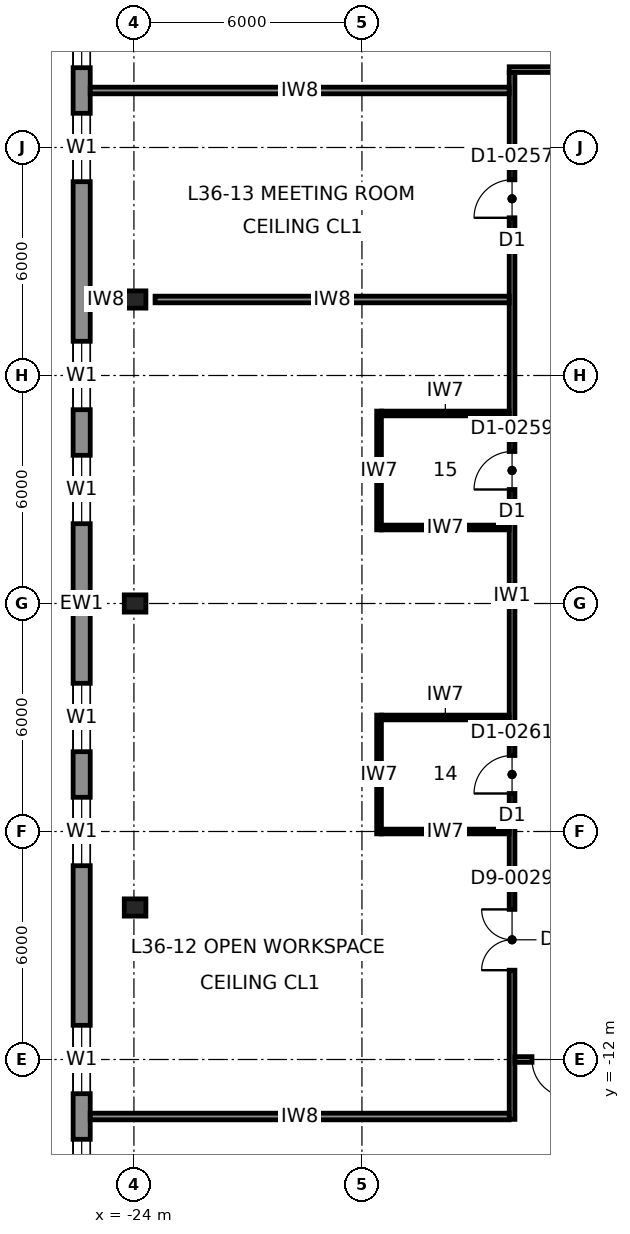
"""IFC4 building model, lengths in metres.
Left out: names, types, materials, properties, quantities, classifications, styles, units other than length and angle.
Written with IfcOpenShell. Run it as: python <this file> out.ifc"""

import sys

from ifc_helpers import new_model, si_unit, direction, frame, frame_2d, origin, origin_2d, place, context, subcontext, project, spatial, rectangle, i_section, extrude, element, fill, save


model = new_model("IFC4")
c1 = context("Model", 3, precision=1e-05, world=origin(), true_north=direction((0.0, 1.0)))
c2 = subcontext(c1, "Body", "Model", "MODEL_VIEW")
j1 = project(units=[si_unit("LENGTHUNIT", "METRE"), si_unit("PLANEANGLEUNIT", "RADIAN")], contexts=[c1])
p1 = place(None, origin())
s1 = spatial("IfcSite", under=j1, at=p1, CompositionType="ELEMENT")
p2 = place(p1, origin())
s2 = spatial("IfcBuilding", under=s1, at=p2, CompositionType="ELEMENT")
p3 = place(p2, frame((0.0, 0.0, 171.8)))
s3 = spatial("IfcBuildingStorey", under=s2, at=p3, CompositionType="ELEMENT", Elevation=171.8)
for number, where, z_axis, x_axis in (
    (1, (-23.969, 0.0, 0.0), (0.04, 0.0, 0.999), (0.0, 1.0, 0.0)),
    (2, (-23.969, 8.0, 0.0), (0.04, 0.0, 0.999), (0.0, 1.0, 0.0)),
    (3, (-23.969, -8.0, 0.0), (0.04, 0.0, 0.999), (0.0, 1.0, 0.0)),
):
    element("IfcColumn", number, at=place(p3, frame(where, z_axis=z_axis, x_axis=x_axis)), inside=s3, PredefinedType="COLUMN", context=c2, shape_type="SweptSolid", body=[
        extrude(i_section(OverallWidth=0.454, OverallDepth=0.569, WebThickness=0.078, FlangeThickness=0.125, at=origin_2d()), origin(), (0.0, 0.0, 1.0), 4.003),
    ])
p4 = place(p3, frame((-25.375, 21.1, 0.0), z_axis=(0.0, 0.0, 1.0), x_axis=(0.0, -1.0, 0.0)))
e4 = element("IfcWall", 4, at=p4, inside=s3, PredefinedType="SOLIDWALL", context=c2, shape_type="SweptSolid", body=[
    extrude(rectangle(XDim=42.2, YDim=0.45, at=frame_2d((21.1, 0.0))), origin(), (0.0, 0.0, 1.0), 3.83),
])
p5 = place(p4, frame((5.2, 0.0, 0.7)))
e5 = element("IfcOpeningElement", 5, at=p5, cuts=e4, PredefinedType="OPENING", context=c2, shape_type="SweptSolid", body=[
    extrude(rectangle(XDim=1.8, YDim=2.6, at=frame_2d((0.9, 1.3))), frame((0.0, 0.235, 0.0), z_axis=(0.0, -1.0, 0.0), x_axis=(1.0, 0.0, 0.0)), (0.0, 0.0, 1.0), 0.47),
])
p6 = place(p4, frame((8.2, 0.0, 0.7)))
e6 = element("IfcOpeningElement", 6, at=p6, cuts=e4, PredefinedType="OPENING", context=c2, shape_type="SweptSolid", body=[
    extrude(rectangle(XDim=1.8, YDim=2.6, at=frame_2d((0.9, 1.3))), frame((0.0, 0.235, 0.0), z_axis=(0.0, -1.0, 0.0), x_axis=(1.0, 0.0, 0.0)), (0.0, 0.0, 1.0), 0.47),
])
p7 = place(p4, frame((14.2, 0.0, 0.7)))
e7 = element("IfcOpeningElement", 7, at=p7, cuts=e4, PredefinedType="OPENING", context=c2, shape_type="SweptSolid", body=[
    extrude(rectangle(XDim=1.8, YDim=2.6, at=frame_2d((0.9, 1.3))), frame((0.0, 0.235, 0.0), z_axis=(0.0, -1.0, 0.0), x_axis=(1.0, 0.0, 0.0)), (0.0, 0.0, 1.0), 0.47),
])
p8 = place(p4, frame((17.2, 0.0, 0.7)))
e8 = element("IfcOpeningElement", 8, at=p8, cuts=e4, PredefinedType="OPENING", context=c2, shape_type="SweptSolid", body=[
    extrude(rectangle(XDim=1.8, YDim=2.6, at=frame_2d((0.9, 1.3))), frame((0.0, 0.235, 0.0), z_axis=(0.0, -1.0, 0.0), x_axis=(1.0, 0.0, 0.0)), (0.0, 0.0, 1.0), 0.47),
])
p9 = place(p4, frame((23.2, 0.0, 0.7)))
e9 = element("IfcOpeningElement", 9, at=p9, cuts=e4, PredefinedType="OPENING", context=c2, shape_type="SweptSolid", body=[
    extrude(rectangle(XDim=1.8, YDim=2.6, at=frame_2d((0.9, 1.3))), frame((0.0, 0.235, 0.0), z_axis=(0.0, -1.0, 0.0), x_axis=(1.0, 0.0, 0.0)), (0.0, 0.0, 1.0), 0.47),
])
p10 = place(p4, frame((26.2, 0.0, 0.7)))
e10 = element("IfcOpeningElement", 10, at=p10, cuts=e4, PredefinedType="OPENING", context=c2, shape_type="SweptSolid", body=[
    extrude(rectangle(XDim=1.8, YDim=2.6, at=frame_2d((0.9, 1.3))), frame((0.0, 0.235, 0.0), z_axis=(0.0, -1.0, 0.0), x_axis=(1.0, 0.0, 0.0)), (0.0, 0.0, 1.0), 0.47),
])
p11 = place(p4, frame((32.2, 0.0, 0.7)))
e11 = element("IfcOpeningElement", 11, at=p11, cuts=e4, PredefinedType="OPENING", context=c2, shape_type="SweptSolid", body=[
    extrude(rectangle(XDim=1.8, YDim=2.6, at=frame_2d((0.9, 1.3))), frame((0.0, 0.235, 0.0), z_axis=(0.0, -1.0, 0.0), x_axis=(1.0, 0.0, 0.0)), (0.0, 0.0, 1.0), 0.47),
])
p12 = place(p4, frame((35.2, 0.0, 0.7)))
e12 = element("IfcOpeningElement", 12, at=p12, cuts=e4, PredefinedType="OPENING", context=c2, shape_type="SweptSolid", body=[
    extrude(rectangle(XDim=1.8, YDim=2.6, at=frame_2d((0.9, 1.3))), frame((0.0, 0.235, 0.0), z_axis=(0.0, -1.0, 0.0), x_axis=(1.0, 0.0, 0.0)), (0.0, 0.0, 1.0), 0.47),
])
p13 = place(p3, frame((-14.125, 14.05, 0.0), z_axis=(0.0, 0.0, 1.0), x_axis=(1.0, 0.0, 0.0)))
e13 = element("IfcWall", 13, at=p13, inside=s3, PredefinedType="PARTITIONING", context=c2, shape_type="SweptSolid", body=[
    extrude(rectangle(XDim=28.25, YDim=0.15, at=frame_2d((14.125, 0.0))), origin(), (0.0, 0.0, 1.0), 3.83),
])
p14 = place(p13, frame((2.425, 0.0, 0.0)))
e14 = element("IfcOpeningElement", 14, at=p14, cuts=e13, PredefinedType="OPENING", context=c2, shape_type="SweptSolid", body=[
    extrude(rectangle(XDim=1.6, YDim=2.3, at=frame_2d((0.8, 1.15))), frame((0.0, 0.085, 0.0), z_axis=(0.0, -1.0, 0.0), x_axis=(1.0, 0.0, 0.0)), (0.0, 0.0, 1.0), 0.17),
])
p15 = place(p13, frame((13.625, 0.0, 0.0)))
e15 = element("IfcOpeningElement", 15, at=p15, cuts=e13, PredefinedType="OPENING", context=c2, shape_type="SweptSolid", body=[
    extrude(rectangle(XDim=1.0, YDim=2.3, at=frame_2d((0.5, 1.15))), frame((0.0, 0.085, 0.0), z_axis=(0.0, -1.0, 0.0), x_axis=(1.0, 0.0, 0.0)), (0.0, 0.0, 1.0), 0.17),
])
p16 = place(p13, frame((24.225, 0.0, 0.0)))
e16 = element("IfcOpeningElement", 16, at=p16, cuts=e13, PredefinedType="OPENING", context=c2, shape_type="SweptSolid", body=[
    extrude(rectangle(XDim=1.6, YDim=2.3, at=frame_2d((0.8, 1.15))), frame((0.0, 0.085, 0.0), z_axis=(0.0, -1.0, 0.0), x_axis=(1.0, 0.0, 0.0)), (0.0, 0.0, 1.0), 0.17),
])
p17 = place(p13, frame((8.625, 0.0, 0.0)))
e17 = element("IfcOpeningElement", 17, at=p17, cuts=e13, PredefinedType="OPENING", context=c2, shape_type="SweptSolid", body=[
    extrude(rectangle(XDim=1.0, YDim=2.3, at=frame_2d((0.5, 1.15))), frame((0.0, 0.085, 0.0), z_axis=(0.0, -1.0, 0.0), x_axis=(1.0, 0.0, 0.0)), (0.0, 0.0, 1.0), 0.17),
])
p18 = place(p13, frame((18.625, 0.0, 0.0)))
e18 = element("IfcOpeningElement", 18, at=p18, cuts=e13, PredefinedType="OPENING", context=c2, shape_type="SweptSolid", body=[
    extrude(rectangle(XDim=1.0, YDim=2.3, at=frame_2d((0.5, 1.15))), frame((0.0, 0.085, 0.0), z_axis=(0.0, -1.0, 0.0), x_axis=(1.0, 0.0, 0.0)), (0.0, 0.0, 1.0), 0.17),
])
p19 = place(p3, frame((-14.05, 13.975, 0.0), z_axis=(0.0, 0.0, 1.0), x_axis=(0.0, -1.0, 0.0)))
e19 = element("IfcWall", 19, at=p19, inside=s3, PredefinedType="PARTITIONING", context=c2, shape_type="SweptSolid", body=[
    extrude(rectangle(XDim=27.55, YDim=0.15, at=frame_2d((13.775, 0.0))), origin(), (0.0, 0.0, 1.0), 3.83),
])
p20 = place(p19, frame((22.025, 0.0, 0.0)))
e20 = element("IfcOpeningElement", 20, at=p20, cuts=e19, PredefinedType="OPENING", context=c2, shape_type="SweptSolid", body=[
    extrude(rectangle(XDim=1.6, YDim=2.3, at=frame_2d((0.8, 1.15))), frame((0.0, 0.085, 0.0), z_axis=(0.0, -1.0, 0.0), x_axis=(1.0, 0.0, 0.0)), (0.0, 0.0, 1.0), 0.17),
])
p21 = place(p19, frame((2.825, 0.0, 0.0)))
e21 = element("IfcOpeningElement", 21, at=p21, cuts=e19, PredefinedType="OPENING", context=c2, shape_type="SweptSolid", body=[
    extrude(rectangle(XDim=1.0, YDim=2.3, at=frame_2d((0.5, 1.15))), frame((0.0, 0.085, 0.0), z_axis=(0.0, -1.0, 0.0), x_axis=(1.0, 0.0, 0.0)), (0.0, 0.0, 1.0), 0.17),
])
p22 = place(p19, frame((17.975, 0.0, 0.0)))
e22 = element("IfcOpeningElement", 22, at=p22, cuts=e19, PredefinedType="OPENING", context=c2, shape_type="SweptSolid", body=[
    extrude(rectangle(XDim=1.0, YDim=2.3, at=frame_2d((0.5, 1.15))), frame((0.0, 0.085, 0.0), z_axis=(0.0, -1.0, 0.0), x_axis=(1.0, 0.0, 0.0)), (0.0, 0.0, 1.0), 0.17),
])
p23 = place(p19, frame((9.975, 0.0, 0.0)))
e23 = element("IfcOpeningElement", 23, at=p23, cuts=e19, PredefinedType="OPENING", context=c2, shape_type="SweptSolid", body=[
    extrude(rectangle(XDim=1.0, YDim=2.3, at=frame_2d((0.5, 1.15))), frame((0.0, 0.085, 0.0), z_axis=(0.0, -1.0, 0.0), x_axis=(1.0, 0.0, 0.0)), (0.0, 0.0, 1.0), 0.17),
])
p24 = place(p3, frame((-12.0, -12.0, 0.0), z_axis=(0.0, 0.0, 1.0), x_axis=(-1.0, 0.0, 0.0)))
e24 = element("IfcWall", 24, at=p24, inside=s3, PredefinedType="PARTITIONING", context=c2, shape_type="SweptSolid", body=[
    extrude(rectangle(XDim=1.975, YDim=0.15, at=frame_2d((0.988, 0.0))), origin(), (0.0, 0.0, 1.0), 3.83),
])
p25 = place(p24, frame((0.525, 0.0, 0.0)))
e25 = element("IfcOpeningElement", 25, at=p25, cuts=e24, PredefinedType="OPENING", context=c2, shape_type="SweptSolid", body=[
    extrude(rectangle(XDim=1.0, YDim=2.3, at=frame_2d((0.5, 1.15))), frame((0.0, 0.085, 0.0), z_axis=(0.0, -1.0, 0.0), x_axis=(1.0, 0.0, 0.0)), (0.0, 0.0, 1.0), 0.17),
])
for number, where, z_axis, x_axis in (
    (26, (-25.15, 13.5, 0.0), (0.0, 0.0, 1.0), (1.0, 0.0, 0.0)),
    (27, (-14.125, -13.5, 0.0), (0.0, 0.0, 1.0), (-1.0, 0.0, 0.0)),
):
    element("IfcWall", number, at=place(p3, frame(where, z_axis=z_axis, x_axis=x_axis)), inside=s3, PredefinedType="PARTITIONING", context=c2, shape_type="SweptSolid", body=[
        extrude(rectangle(XDim=11.025, YDim=0.175, at=frame_2d((5.512, 0.0))), origin(), (0.0, 0.0, 1.0), 3.83),
    ])
p26 = place(p3, frame((-14.125, 8.0, 0.0), z_axis=(0.0, 0.0, 1.0), x_axis=(-1.0, 0.0, 0.0)))
e28 = element("IfcWall", 28, at=p26, inside=s3, PredefinedType="PARTITIONING", context=c2, shape_type="SweptSolid", body=[
    extrude(rectangle(XDim=9.319, YDim=0.175, at=frame_2d((4.66, 0.0))), origin(), (0.0, 0.0, 1.0), 2.84),
])
p27 = place(p3, frame((-24.333, 8.0, 0.0), z_axis=(0.0, 0.0, 1.0), x_axis=(-1.0, 0.0, 0.0)))
e29 = element("IfcWall", 29, at=p27, inside=s3, PredefinedType="PARTITIONING", context=c2, shape_type="SweptSolid", body=[
    extrude(rectangle(XDim=0.817, YDim=0.175, at=frame_2d((0.408, 0.0))), origin(), (0.0, 0.0, 1.0), 3.83),
])
p28 = place(p3, frame((-17.55, -6.062, 0.0), z_axis=(0.0, 0.0, 1.0), x_axis=(0.0, 1.0, 0.0)))
e30 = element("IfcWall", 30, at=p28, inside=s3, PredefinedType="PARTITIONING", context=c2, shape_type="SweptSolid", body=[
    extrude(rectangle(XDim=3.125, YDim=0.125, at=frame_2d((1.562, 0.0))), origin(), (0.0, 0.0, 1.0), 3.83),
])
for number, where, z_axis, x_axis in (
    (31, (-14.125, -6.0, 0.0), (0.0, 0.0, 1.0), (-1.0, 0.0, 0.0)),
    (32, (-14.125, -3.0, 0.0), (0.0, 0.0, 1.0), (-1.0, 0.0, 0.0)),
):
    element("IfcWall", number, at=place(p3, frame(where, z_axis=z_axis, x_axis=x_axis)), inside=s3, PredefinedType="PARTITIONING", context=c2, shape_type="SweptSolid", body=[
        extrude(rectangle(XDim=3.363, YDim=0.125, at=frame_2d((1.681, 0.0))), origin(), (0.0, 0.0, 1.0), 3.83),
    ])
p29 = place(p3, frame((-17.55, 1.938, 0.0), z_axis=(0.0, 0.0, 1.0), x_axis=(0.0, 1.0, 0.0)))
e33 = element("IfcWall", 33, at=p29, inside=s3, PredefinedType="PARTITIONING", context=c2, shape_type="SweptSolid", body=[
    extrude(rectangle(XDim=3.125, YDim=0.125, at=frame_2d((1.562, 0.0))), origin(), (0.0, 0.0, 1.0), 3.83),
])
for number, where, z_axis, x_axis in (
    (34, (-14.125, 2.0, 0.0), (0.0, 0.0, 1.0), (-1.0, 0.0, 0.0)),
    (35, (-14.125, 5.0, 0.0), (0.0, 0.0, 1.0), (-1.0, 0.0, 0.0)),
):
    element("IfcWall", number, at=place(p3, frame(where, z_axis=z_axis, x_axis=x_axis)), inside=s3, PredefinedType="PARTITIONING", context=c2, shape_type="SweptSolid", body=[
        extrude(rectangle(XDim=3.363, YDim=0.125, at=frame_2d((1.681, 0.0))), origin(), (0.0, 0.0, 1.0), 3.83),
    ])
p30 = place(p5, origin())
e36 = element("IfcWindow", 36, at=p30, inside=s3, PartitioningType="SINGLE_PANEL", PredefinedType="WINDOW", context=c2, shape_type="SweptSolid", body=[
    extrude(rectangle(XDim=1.8, YDim=2.6, at=frame_2d((0.9, 1.3))), frame((0.0, 0.03, 0.0), z_axis=(0.0, -1.0, 0.0), x_axis=(1.0, 0.0, 0.0)), (0.0, 0.0, 1.0), 0.06),
])
fill(e5, e36)
p31 = place(p6, origin())
e37 = element("IfcWindow", 37, at=p31, inside=s3, PartitioningType="SINGLE_PANEL", PredefinedType="WINDOW", context=c2, shape_type="SweptSolid", body=[
    extrude(rectangle(XDim=1.8, YDim=2.6, at=frame_2d((0.9, 1.3))), frame((0.0, 0.03, 0.0), z_axis=(0.0, -1.0, 0.0), x_axis=(1.0, 0.0, 0.0)), (0.0, 0.0, 1.0), 0.06),
])
fill(e6, e37)
p32 = place(p7, origin())
e38 = element("IfcWindow", 38, at=p32, inside=s3, PartitioningType="SINGLE_PANEL", PredefinedType="WINDOW", context=c2, shape_type="SweptSolid", body=[
    extrude(rectangle(XDim=1.8, YDim=2.6, at=frame_2d((0.9, 1.3))), frame((0.0, 0.03, 0.0), z_axis=(0.0, -1.0, 0.0), x_axis=(1.0, 0.0, 0.0)), (0.0, 0.0, 1.0), 0.06),
])
fill(e7, e38)
p33 = place(p8, origin())
e39 = element("IfcWindow", 39, at=p33, inside=s3, PartitioningType="SINGLE_PANEL", PredefinedType="WINDOW", context=c2, shape_type="SweptSolid", body=[
    extrude(rectangle(XDim=1.8, YDim=2.6, at=frame_2d((0.9, 1.3))), frame((0.0, 0.03, 0.0), z_axis=(0.0, -1.0, 0.0), x_axis=(1.0, 0.0, 0.0)), (0.0, 0.0, 1.0), 0.06),
])
fill(e8, e39)
p34 = place(p9, origin())
e40 = element("IfcWindow", 40, at=p34, inside=s3, PartitioningType="SINGLE_PANEL", PredefinedType="WINDOW", context=c2, shape_type="SweptSolid", body=[
    extrude(rectangle(XDim=1.8, YDim=2.6, at=frame_2d((0.9, 1.3))), frame((0.0, 0.03, 0.0), z_axis=(0.0, -1.0, 0.0), x_axis=(1.0, 0.0, 0.0)), (0.0, 0.0, 1.0), 0.06),
])
fill(e9, e40)
p35 = place(p10, origin())
e41 = element("IfcWindow", 41, at=p35, inside=s3, PartitioningType="SINGLE_PANEL", PredefinedType="WINDOW", context=c2, shape_type="SweptSolid", body=[
    extrude(rectangle(XDim=1.8, YDim=2.6, at=frame_2d((0.9, 1.3))), frame((0.0, 0.03, 0.0), z_axis=(0.0, -1.0, 0.0), x_axis=(1.0, 0.0, 0.0)), (0.0, 0.0, 1.0), 0.06),
])
fill(e10, e41)
p36 = place(p11, origin())
e42 = element("IfcWindow", 42, at=p36, inside=s3, PartitioningType="SINGLE_PANEL", PredefinedType="WINDOW", context=c2, shape_type="SweptSolid", body=[
    extrude(rectangle(XDim=1.8, YDim=2.6, at=frame_2d((0.9, 1.3))), frame((0.0, 0.03, 0.0), z_axis=(0.0, -1.0, 0.0), x_axis=(1.0, 0.0, 0.0)), (0.0, 0.0, 1.0), 0.06),
])
fill(e11, e42)
p37 = place(p12, origin())
e43 = element("IfcWindow", 43, at=p37, inside=s3, PartitioningType="SINGLE_PANEL", PredefinedType="WINDOW", context=c2, shape_type="SweptSolid", body=[
    extrude(rectangle(XDim=1.8, YDim=2.6, at=frame_2d((0.9, 1.3))), frame((0.0, 0.03, 0.0), z_axis=(0.0, -1.0, 0.0), x_axis=(1.0, 0.0, 0.0)), (0.0, 0.0, 1.0), 0.06),
])
fill(e12, e43)
p38 = place(p25, origin())
e44 = element("IfcDoor", 44, at=p38, inside=s3, OperationType="SINGLE_SWING_LEFT", PredefinedType="DOOR", context=c2, shape_type="SweptSolid", body=[
    extrude(rectangle(XDim=1.0, YDim=2.3, at=frame_2d((0.5, 1.15))), frame((0.0, 0.025, 0.0), z_axis=(0.0, -1.0, 0.0), x_axis=(1.0, 0.0, 0.0)), (0.0, 0.0, 1.0), 0.05),
])
fill(e25, e44)
p39 = place(p20, frame((1.6, 0.0, 0.0), z_axis=(0.0, 0.0, 1.0), x_axis=(-1.0, 0.0, 0.0)))
e45 = element("IfcDoor", 45, at=p39, inside=s3, OperationType="DOUBLE_DOOR_SINGLE_SWING", PredefinedType="DOOR", context=c2, shape_type="SweptSolid", body=[
    extrude(rectangle(XDim=1.6, YDim=2.3, at=frame_2d((0.8, 1.15))), frame((0.0, 0.025, 0.0), z_axis=(0.0, -1.0, 0.0), x_axis=(1.0, 0.0, 0.0)), (0.0, 0.0, 1.0), 0.05),
])
fill(e20, e45)
p40 = place(p21, frame((1.0, 0.0, 0.0), z_axis=(0.0, 0.0, 1.0), x_axis=(-1.0, 0.0, 0.0)))
e46 = element("IfcDoor", 46, at=p40, inside=s3, OperationType="SINGLE_SWING_LEFT", PredefinedType="DOOR", context=c2, shape_type="SweptSolid", body=[
    extrude(rectangle(XDim=1.0, YDim=2.3, at=frame_2d((0.5, 1.15))), frame((0.0, 0.025, 0.0), z_axis=(0.0, -1.0, 0.0), x_axis=(1.0, 0.0, 0.0)), (0.0, 0.0, 1.0), 0.05),
])
fill(e21, e46)
p41 = place(p22, frame((1.0, 0.0, 0.0), z_axis=(0.0, 0.0, 1.0), x_axis=(-1.0, 0.0, 0.0)))
e47 = element("IfcDoor", 47, at=p41, inside=s3, OperationType="SINGLE_SWING_LEFT", PredefinedType="DOOR", context=c2, shape_type="SweptSolid", body=[
    extrude(rectangle(XDim=1.0, YDim=2.3, at=frame_2d((0.5, 1.15))), frame((0.0, 0.025, 0.0), z_axis=(0.0, -1.0, 0.0), x_axis=(1.0, 0.0, 0.0)), (0.0, 0.0, 1.0), 0.05),
])
fill(e22, e47)
p42 = place(p23, frame((1.0, 0.0, 0.0), z_axis=(0.0, 0.0, 1.0), x_axis=(-1.0, 0.0, 0.0)))
e48 = element("IfcDoor", 48, at=p42, inside=s3, OperationType="SINGLE_SWING_LEFT", PredefinedType="DOOR", context=c2, shape_type="SweptSolid", body=[
    extrude(rectangle(XDim=1.0, YDim=2.3, at=frame_2d((0.5, 1.15))), frame((0.0, 0.025, 0.0), z_axis=(0.0, -1.0, 0.0), x_axis=(1.0, 0.0, 0.0)), (0.0, 0.0, 1.0), 0.05),
])
fill(e23, e48)
save(model, sys.argv[1])
